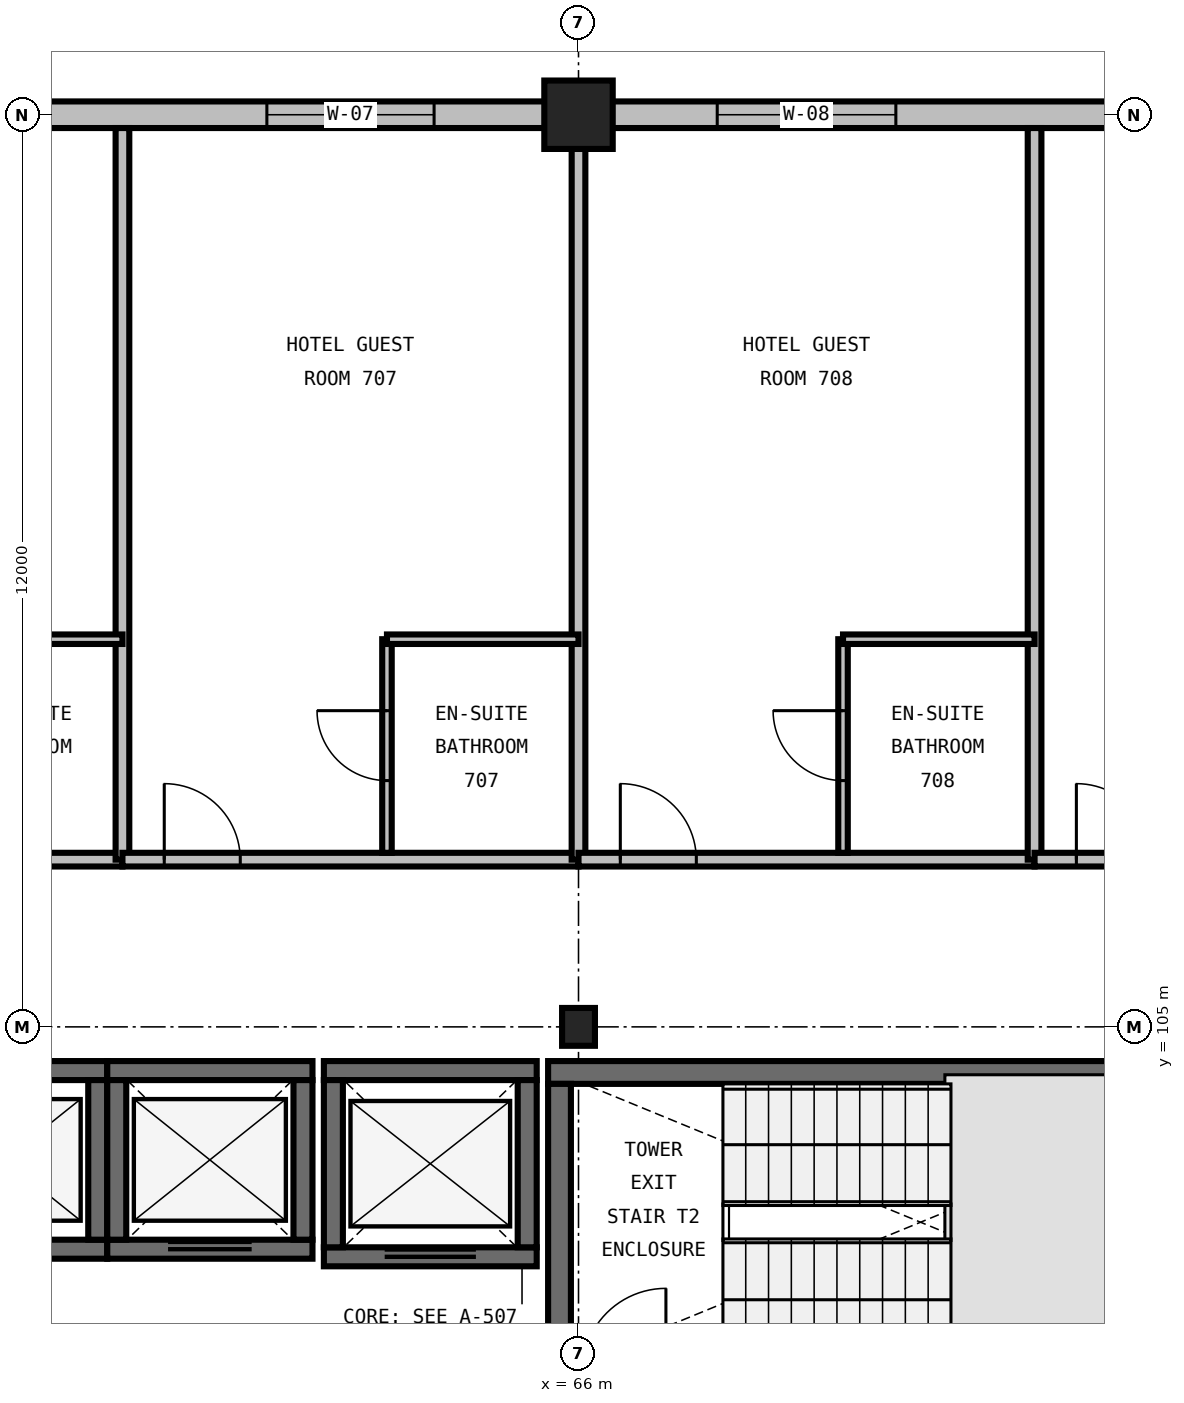
"""IFC4 building model, lengths in metres.
Left out: names, types, materials, properties, quantities, classifications, styles, units other than length and angle.
Written with IfcOpenShell. Run it as: python <this file> out.ifc"""

import sys

from ifc_helpers import new_model, si_unit, direction, frame, frame_2d, origin, origin_2d, place, context, subcontext, project, spatial, rectangle, i_section, extrude, element, fill, save


model = new_model("IFC4")
c1 = context("Model", 3, precision=1e-05, world=origin(), true_north=direction((0.0, 1.0)))
c2 = subcontext(c1, "Body", "Model", "MODEL_VIEW")
j1 = project(units=[si_unit("LENGTHUNIT", "METRE"), si_unit("PLANEANGLEUNIT", "RADIAN")], contexts=[c1])
p1 = place(None, origin())
s1 = spatial("IfcSite", under=j1, at=p1, CompositionType="ELEMENT")
p2 = place(p1, origin())
s2 = spatial("IfcBuilding", under=s1, at=p2, CompositionType="ELEMENT")
p3 = place(p2, frame((0.0, 0.0, 34.8)))
s3 = spatial("IfcBuildingStorey", under=s2, at=p3, CompositionType="ELEMENT", Elevation=34.8)
p4 = place(p3, frame((66.0, 105.0, 0.0), z_axis=(0.0, 0.0, 1.0), x_axis=(1.0, 0.0, 0.0)))
e1 = element("IfcColumn", 1, at=p4, inside=s3, PredefinedType="COLUMN", context=c2, shape_type="SweptSolid", body=[
    extrude(i_section(OverallWidth=0.432, OverallDepth=0.498, WebThickness=0.056, FlangeThickness=0.089, FilletRadius=0.031, at=origin_2d()), origin(), (0.0, 0.0, 1.0), 3.6),
])
p5 = place(p3, frame((66.0, 117.0, 0.0), z_axis=(0.0, 0.0, 1.0), x_axis=(1.0, 0.0, 0.0)))
e2 = element("IfcColumn", 2, at=p5, inside=s3, PredefinedType="COLUMN", context=c2, shape_type="SweptSolid", body=[
    extrude(rectangle(XDim=0.9, YDim=0.9, at=origin_2d()), origin(), (0.0, 0.0, 1.0), 3.6),
])
p6 = place(p3, frame((75.4, 104.4, 0.0), z_axis=(0.0, 0.0, 1.0), x_axis=(-1.0, 0.0, 0.0)))
e3 = element("IfcWall", 3, at=p6, inside=s3, PredefinedType="SHEAR", context=c2, shape_type="SweptSolid", body=[
    extrude(rectangle(XDim=9.8, YDim=0.3, at=frame_2d((4.9, 0.0))), origin(), (0.0, 0.0, 1.0), 3.6),
])
p7 = place(p3, frame((65.75, 104.25, 0.0), z_axis=(0.0, 0.0, 1.0), x_axis=(0.0, -1.0, 0.0)))
e4 = element("IfcWall", 4, at=p7, inside=s3, PredefinedType="SHEAR", context=c2, shape_type="SweptSolid", body=[
    extrude(rectangle(XDim=3.64, YDim=0.3, at=frame_2d((1.82, 0.0))), origin(), (0.0, 0.0, 1.0), 3.6),
])
p8 = place(p3, frame((62.65, 101.975, 0.0), z_axis=(0.0, 0.0, 1.0), x_axis=(1.0, 0.0, 0.0)))
e5 = element("IfcWall", 5, at=p8, inside=s3, PredefinedType="SHEAR", context=c2, shape_type="SweptSolid", body=[
    extrude(rectangle(XDim=2.8, YDim=0.25, at=frame_2d((1.4, 0.0))), origin(), (0.0, 0.0, 1.0), 3.6),
])
p9 = place(p8, frame((0.8, 0.0, 0.0)))
e6 = element("IfcOpeningElement", 6, at=p9, cuts=e5, PredefinedType="OPENING", context=c2, shape_type="SweptSolid", body=[
    extrude(rectangle(XDim=1.2, YDim=2.2, at=frame_2d((0.6, 1.1))), frame((0.0, 0.14, 0.0), z_axis=(0.0, -1.0, 0.0), x_axis=(1.0, 0.0, 0.0)), (0.0, 0.0, 1.0), 0.28),
])
p10 = place(p3, frame((65.45, 104.425, 0.0), z_axis=(0.0, 0.0, 1.0), x_axis=(-1.0, 0.0, 0.0)))
e7 = element("IfcWall", 7, at=p10, inside=s3, PredefinedType="SHEAR", context=c2, shape_type="SweptSolid", body=[
    extrude(rectangle(XDim=2.8, YDim=0.25, at=frame_2d((1.4, 0.0))), origin(), (0.0, 0.0, 1.0), 3.6),
])
for number, where, z_axis, x_axis in (
    (8, (62.775, 104.3, 0.0), (0.0, 0.0, 1.0), (0.0, -1.0, 0.0)),
    (9, (65.325, 102.1, 0.0), (0.0, 0.0, 1.0), (0.0, 1.0, 0.0)),
):
    element("IfcWall", number, at=place(p3, frame(where, z_axis=z_axis, x_axis=x_axis)), inside=s3, PredefinedType="SHEAR", context=c2, shape_type="SweptSolid", body=[
        extrude(rectangle(XDim=2.2, YDim=0.25, at=frame_2d((1.1, 0.0))), origin(), (0.0, 0.0, 1.0), 3.6),
    ])
p11 = place(p3, frame((57.1, 102.075, 0.0), z_axis=(0.0, 0.0, 1.0), x_axis=(1.0, 0.0, 0.0)))
e10 = element("IfcWall", 10, at=p11, inside=s3, PredefinedType="SHEAR", context=c2, shape_type="SweptSolid", body=[
    extrude(rectangle(XDim=2.7, YDim=0.25, at=frame_2d((1.35, 0.0))), origin(), (0.0, 0.0, 1.0), 3.6),
])
p12 = place(p11, frame((0.8, 0.0, 0.0)))
e11 = element("IfcOpeningElement", 11, at=p12, cuts=e10, PredefinedType="OPENING", context=c2, shape_type="SweptSolid", body=[
    extrude(rectangle(XDim=1.1, YDim=2.2, at=frame_2d((0.55, 1.1))), frame((0.0, 0.14, 0.0), z_axis=(0.0, -1.0, 0.0), x_axis=(1.0, 0.0, 0.0)), (0.0, 0.0, 1.0), 0.28),
])
p13 = place(p3, frame((59.8, 104.425, 0.0), z_axis=(0.0, 0.0, 1.0), x_axis=(-1.0, 0.0, 0.0)))
e12 = element("IfcWall", 12, at=p13, inside=s3, PredefinedType="SHEAR", context=c2, shape_type="SweptSolid", body=[
    extrude(rectangle(XDim=2.7, YDim=0.25, at=frame_2d((1.35, 0.0))), origin(), (0.0, 0.0, 1.0), 3.6),
])
p14 = place(p3, frame((59.675, 102.2, 0.0), z_axis=(0.0, 0.0, 1.0), x_axis=(0.0, 1.0, 0.0)))
e13 = element("IfcWall", 13, at=p14, inside=s3, PredefinedType="SHEAR", context=c2, shape_type="SweptSolid", body=[
    extrude(rectangle(XDim=2.1, YDim=0.25, at=frame_2d((1.05, 0.0))), origin(), (0.0, 0.0, 1.0), 3.6),
])
p15 = place(p3, frame((59.8, 102.075, 0.0), z_axis=(0.0, 0.0, 1.0), x_axis=(1.0, 0.0, 0.0)))
e14 = element("IfcWall", 14, at=p15, inside=s3, PredefinedType="SHEAR", context=c2, shape_type="SweptSolid", body=[
    extrude(rectangle(XDim=2.7, YDim=0.25, at=frame_2d((1.35, 0.0))), origin(), (0.0, 0.0, 1.0), 3.6),
])
p16 = place(p15, frame((0.8, 0.0, 0.0)))
e15 = element("IfcOpeningElement", 15, at=p16, cuts=e14, PredefinedType="OPENING", context=c2, shape_type="SweptSolid", body=[
    extrude(rectangle(XDim=1.1, YDim=2.2, at=frame_2d((0.55, 1.1))), frame((0.0, 0.14, 0.0), z_axis=(0.0, -1.0, 0.0), x_axis=(1.0, 0.0, 0.0)), (0.0, 0.0, 1.0), 0.28),
])
p17 = place(p3, frame((62.5, 104.425, 0.0), z_axis=(0.0, 0.0, 1.0), x_axis=(-1.0, 0.0, 0.0)))
e16 = element("IfcWall", 16, at=p17, inside=s3, PredefinedType="SHEAR", context=c2, shape_type="SweptSolid", body=[
    extrude(rectangle(XDim=2.7, YDim=0.25, at=frame_2d((1.35, 0.0))), origin(), (0.0, 0.0, 1.0), 3.6),
])
for number, where, z_axis, x_axis in (
    (17, (59.925, 104.3, 0.0), (0.0, 0.0, 1.0), (0.0, -1.0, 0.0)),
    (18, (62.375, 102.2, 0.0), (0.0, 0.0, 1.0), (0.0, 1.0, 0.0)),
):
    element("IfcWall", number, at=place(p3, frame(where, z_axis=z_axis, x_axis=x_axis)), inside=s3, PredefinedType="SHEAR", context=c2, shape_type="SweptSolid", body=[
        extrude(rectangle(XDim=2.1, YDim=0.25, at=frame_2d((1.05, 0.0))), origin(), (0.0, 0.0, 1.0), 3.6),
    ])
p18 = place(p3, frame((66.0, 117.0, 0.0), z_axis=(0.0, 0.0, 1.0), x_axis=(-1.0, 0.0, 0.0)))
e19 = element("IfcWall", 19, at=p18, inside=s3, PredefinedType="STANDARD", context=c2, shape_type="SweptSolid", body=[
    extrude(rectangle(XDim=12.0, YDim=0.35, at=frame_2d((6.0, 0.0))), origin(), (0.0, 0.0, 1.0), 2.486),
])
p19 = place(p18, frame((1.9, 0.0, 0.75)))
e20 = element("IfcOpeningElement", 20, at=p19, cuts=e19, PredefinedType="OPENING", context=c2, shape_type="SweptSolid", body=[
    extrude(rectangle(XDim=2.2, YDim=1.6, at=frame_2d((1.1, 0.8))), frame((0.0, 0.19, 0.0), z_axis=(0.0, -1.0, 0.0), x_axis=(1.0, 0.0, 0.0)), (0.0, 0.0, 1.0), 0.38),
])
p20 = place(p18, frame((7.825, 0.0, 0.75)))
e21 = element("IfcOpeningElement", 21, at=p20, cuts=e19, PredefinedType="OPENING", context=c2, shape_type="SweptSolid", body=[
    extrude(rectangle(XDim=2.35, YDim=1.6, at=frame_2d((1.175, 0.8))), frame((0.0, 0.19, 0.0), z_axis=(0.0, -1.0, 0.0), x_axis=(1.0, 0.0, 0.0)), (0.0, 0.0, 1.0), 0.38),
])
p21 = place(p3, frame((78.0, 117.0, 0.0), z_axis=(0.0, 0.0, 1.0), x_axis=(-1.0, 0.0, 0.0)))
e22 = element("IfcWall", 22, at=p21, inside=s3, PredefinedType="STANDARD", context=c2, shape_type="SweptSolid", body=[
    extrude(rectangle(XDim=12.0, YDim=0.35, at=frame_2d((6.0, 0.0))), origin(), (0.0, 0.0, 1.0), 2.486),
])
p22 = place(p21, frame((1.9, 0.0, 0.75)))
e23 = element("IfcOpeningElement", 23, at=p22, cuts=e22, PredefinedType="OPENING", context=c2, shape_type="SweptSolid", body=[
    extrude(rectangle(XDim=2.2, YDim=1.6, at=frame_2d((1.1, 0.8))), frame((0.0, 0.19, 0.0), z_axis=(0.0, -1.0, 0.0), x_axis=(1.0, 0.0, 0.0)), (0.0, 0.0, 1.0), 0.38),
])
p23 = place(p21, frame((7.825, 0.0, 0.75)))
e24 = element("IfcOpeningElement", 24, at=p23, cuts=e22, PredefinedType="OPENING", context=c2, shape_type="SweptSolid", body=[
    extrude(rectangle(XDim=2.35, YDim=1.6, at=frame_2d((1.175, 0.8))), frame((0.0, 0.19, 0.0), z_axis=(0.0, -1.0, 0.0), x_axis=(1.0, 0.0, 0.0)), (0.0, 0.0, 1.0), 0.38),
])
p24 = place(p3, frame((54.0, 107.2, 0.0), z_axis=(0.0, 0.0, 1.0), x_axis=(1.0, 0.0, 0.0)))
e25 = element("IfcWall", 25, at=p24, inside=s3, PredefinedType="PARTITIONING", context=c2, shape_type="SweptSolid", body=[
    extrude(rectangle(XDim=6.0, YDim=0.18, at=frame_2d((3.0, 0.0))), origin(), (0.0, 0.0, 1.0), 3.29),
])
p25 = place(p24, frame((0.55, 0.0, 0.0)))
e26 = element("IfcOpeningElement", 26, at=p25, cuts=e25, PredefinedType="OPENING", context=c2, shape_type="SweptSolid", body=[
    extrude(rectangle(XDim=1.0, YDim=2.15, at=frame_2d((0.5, 1.075))), frame((0.0, 0.105, 0.0), z_axis=(0.0, -1.0, 0.0), x_axis=(1.0, 0.0, 0.0)), (0.0, 0.0, 1.0), 0.21),
])
p26 = place(p3, frame((60.0, 107.2, 0.0), z_axis=(0.0, 0.0, 1.0), x_axis=(0.0, 1.0, 0.0)))
e27 = element("IfcWall", 27, at=p26, inside=s3, PredefinedType="PARTITIONING", context=c2, shape_type="SweptSolid", body=[
    extrude(rectangle(XDim=9.625, YDim=0.18, at=frame_2d((4.812, 0.0))), origin(), (0.0, 0.0, 1.0), 3.29),
])
p27 = place(p3, frame((57.48, 110.1, 0.0), z_axis=(0.0, 0.0, 1.0), x_axis=(1.0, 0.0, 0.0)))
e28 = element("IfcWall", 28, at=p27, inside=s3, PredefinedType="PARTITIONING", context=c2, shape_type="SweptSolid", body=[
    extrude(rectangle(XDim=2.52, YDim=0.125, at=frame_2d((1.26, 0.0))), origin(), (0.0, 0.0, 1.0), 3.29),
])
p28 = place(p3, frame((60.0, 107.2, 0.0), z_axis=(0.0, 0.0, 1.0), x_axis=(1.0, 0.0, 0.0)))
e29 = element("IfcWall", 29, at=p28, inside=s3, PredefinedType="PARTITIONING", context=c2, shape_type="SweptSolid", body=[
    extrude(rectangle(XDim=6.0, YDim=0.18, at=frame_2d((3.0, 0.0))), origin(), (0.0, 0.0, 1.0), 3.29),
])
p29 = place(p28, frame((0.55, 0.0, 0.0)))
e30 = element("IfcOpeningElement", 30, at=p29, cuts=e29, PredefinedType="OPENING", context=c2, shape_type="SweptSolid", body=[
    extrude(rectangle(XDim=1.0, YDim=2.15, at=frame_2d((0.5, 1.075))), frame((0.0, 0.105, 0.0), z_axis=(0.0, -1.0, 0.0), x_axis=(1.0, 0.0, 0.0)), (0.0, 0.0, 1.0), 0.21),
])
p30 = place(p3, frame((66.0, 107.2, 0.0), z_axis=(0.0, 0.0, 1.0), x_axis=(0.0, 1.0, 0.0)))
e31 = element("IfcWall", 31, at=p30, inside=s3, PredefinedType="PARTITIONING", context=c2, shape_type="SweptSolid", body=[
    extrude(rectangle(XDim=9.625, YDim=0.18, at=frame_2d((4.812, 0.0))), origin(), (0.0, 0.0, 1.0), 2.59),
])
p31 = place(p3, frame((63.48, 107.29, 0.0), z_axis=(0.0, 0.0, 1.0), x_axis=(0.0, 1.0, 0.0)))
e32 = element("IfcWall", 32, at=p31, inside=s3, PredefinedType="PARTITIONING", context=c2, shape_type="SweptSolid", body=[
    extrude(rectangle(XDim=2.81, YDim=0.125, at=frame_2d((1.405, 0.0))), origin(), (0.0, 0.0, 1.0), 3.29),
])
p32 = place(p31, frame((0.95, 0.0, 0.0)))
e33 = element("IfcOpeningElement", 33, at=p32, cuts=e32, PredefinedType="OPENING", context=c2, shape_type="SweptSolid", body=[
    extrude(rectangle(XDim=0.92, YDim=2.1, at=frame_2d((0.46, 1.05))), frame((0.0, 0.077, 0.0), z_axis=(0.0, -1.0, 0.0), x_axis=(1.0, 0.0, 0.0)), (0.0, 0.0, 1.0), 0.155),
])
p33 = place(p3, frame((63.48, 110.1, 0.0), z_axis=(0.0, 0.0, 1.0), x_axis=(1.0, 0.0, 0.0)))
e34 = element("IfcWall", 34, at=p33, inside=s3, PredefinedType="PARTITIONING", context=c2, shape_type="SweptSolid", body=[
    extrude(rectangle(XDim=2.52, YDim=0.125, at=frame_2d((1.26, 0.0))), origin(), (0.0, 0.0, 1.0), 3.29),
])
p34 = place(p3, frame((66.0, 107.2, 0.0), z_axis=(0.0, 0.0, 1.0), x_axis=(1.0, 0.0, 0.0)))
e35 = element("IfcWall", 35, at=p34, inside=s3, PredefinedType="PARTITIONING", context=c2, shape_type="SweptSolid", body=[
    extrude(rectangle(XDim=6.0, YDim=0.18, at=frame_2d((3.0, 0.0))), origin(), (0.0, 0.0, 1.0), 3.29),
])
p35 = place(p34, frame((0.55, 0.0, 0.0)))
e36 = element("IfcOpeningElement", 36, at=p35, cuts=e35, PredefinedType="OPENING", context=c2, shape_type="SweptSolid", body=[
    extrude(rectangle(XDim=1.0, YDim=2.15, at=frame_2d((0.5, 1.075))), frame((0.0, 0.105, 0.0), z_axis=(0.0, -1.0, 0.0), x_axis=(1.0, 0.0, 0.0)), (0.0, 0.0, 1.0), 0.21),
])
p36 = place(p3, frame((72.0, 107.2, 0.0), z_axis=(0.0, 0.0, 1.0), x_axis=(0.0, 1.0, 0.0)))
e37 = element("IfcWall", 37, at=p36, inside=s3, PredefinedType="PARTITIONING", context=c2, shape_type="SweptSolid", body=[
    extrude(rectangle(XDim=9.625, YDim=0.18, at=frame_2d((4.812, 0.0))), origin(), (0.0, 0.0, 1.0), 3.29),
])
p37 = place(p3, frame((69.48, 107.29, 0.0), z_axis=(0.0, 0.0, 1.0), x_axis=(0.0, 1.0, 0.0)))
e38 = element("IfcWall", 38, at=p37, inside=s3, PredefinedType="PARTITIONING", context=c2, shape_type="SweptSolid", body=[
    extrude(rectangle(XDim=2.81, YDim=0.125, at=frame_2d((1.405, 0.0))), origin(), (0.0, 0.0, 1.0), 3.29),
])
p38 = place(p37, frame((0.95, 0.0, 0.0)))
e39 = element("IfcOpeningElement", 39, at=p38, cuts=e38, PredefinedType="OPENING", context=c2, shape_type="SweptSolid", body=[
    extrude(rectangle(XDim=0.92, YDim=2.1, at=frame_2d((0.46, 1.05))), frame((0.0, 0.077, 0.0), z_axis=(0.0, -1.0, 0.0), x_axis=(1.0, 0.0, 0.0)), (0.0, 0.0, 1.0), 0.155),
])
p39 = place(p3, frame((69.48, 110.1, 0.0), z_axis=(0.0, 0.0, 1.0), x_axis=(1.0, 0.0, 0.0)))
e40 = element("IfcWall", 40, at=p39, inside=s3, PredefinedType="PARTITIONING", context=c2, shape_type="SweptSolid", body=[
    extrude(rectangle(XDim=2.52, YDim=0.125, at=frame_2d((1.26, 0.0))), origin(), (0.0, 0.0, 1.0), 3.29),
])
p40 = place(p3, frame((72.0, 107.2, 0.0), z_axis=(0.0, 0.0, 1.0), x_axis=(1.0, 0.0, 0.0)))
e41 = element("IfcWall", 41, at=p40, inside=s3, PredefinedType="PARTITIONING", context=c2, shape_type="SweptSolid", body=[
    extrude(rectangle(XDim=6.0, YDim=0.18, at=frame_2d((3.0, 0.0))), origin(), (0.0, 0.0, 1.0), 3.29),
])
p41 = place(p40, frame((0.55, 0.0, 0.0)))
e42 = element("IfcOpeningElement", 42, at=p41, cuts=e41, PredefinedType="OPENING", context=c2, shape_type="SweptSolid", body=[
    extrude(rectangle(XDim=1.0, YDim=2.15, at=frame_2d((0.5, 1.075))), frame((0.0, 0.105, 0.0), z_axis=(0.0, -1.0, 0.0), x_axis=(1.0, 0.0, 0.0)), (0.0, 0.0, 1.0), 0.21),
])
p42 = place(p9, origin())
e43 = element("IfcDoor", 43, at=p42, inside=s3, OperationType="DOUBLE_DOOR_SLIDING", PredefinedType="DOOR", context=c2, shape_type="SweptSolid", body=[
    extrude(rectangle(XDim=1.2, YDim=2.2, at=frame_2d((0.6, 1.1))), frame((0.0, 0.025, 0.0), z_axis=(0.0, -1.0, 0.0), x_axis=(1.0, 0.0, 0.0)), (0.0, 0.0, 1.0), 0.05),
])
fill(e6, e43)
p43 = place(p16, origin())
e44 = element("IfcDoor", 44, at=p43, inside=s3, OperationType="DOUBLE_DOOR_SLIDING", PredefinedType="DOOR", context=c2, shape_type="SweptSolid", body=[
    extrude(rectangle(XDim=1.1, YDim=2.2, at=frame_2d((0.55, 1.1))), frame((0.0, 0.025, 0.0), z_axis=(0.0, -1.0, 0.0), x_axis=(1.0, 0.0, 0.0)), (0.0, 0.0, 1.0), 0.05),
])
fill(e15, e44)
p44 = place(p19, origin())
e45 = element("IfcWindow", 45, at=p44, inside=s3, PartitioningType="DOUBLE_PANEL_VERTICAL", PredefinedType="WINDOW", context=c2, shape_type="SweptSolid", body=[
    extrude(rectangle(XDim=2.2, YDim=1.6, at=frame_2d((1.1, 0.8))), frame((0.0, 0.03, 0.0), z_axis=(0.0, -1.0, 0.0), x_axis=(1.0, 0.0, 0.0)), (0.0, 0.0, 1.0), 0.06),
])
fill(e20, e45)
p45 = place(p23, origin())
e46 = element("IfcWindow", 46, at=p45, inside=s3, PartitioningType="DOUBLE_PANEL_VERTICAL", PredefinedType="WINDOW", context=c2, shape_type="SweptSolid", body=[
    extrude(rectangle(XDim=2.35, YDim=1.6, at=frame_2d((1.175, 0.8))), frame((0.0, 0.03, 0.0), z_axis=(0.0, -1.0, 0.0), x_axis=(1.0, 0.0, 0.0)), (0.0, 0.0, 1.0), 0.06),
])
fill(e24, e46)
p46 = place(p29, origin())
e47 = element("IfcDoor", 47, at=p46, inside=s3, OperationType="SINGLE_SWING_LEFT", PredefinedType="DOOR", context=c2, shape_type="SweptSolid", body=[
    extrude(rectangle(XDim=1.0, YDim=2.15, at=frame_2d((0.5, 1.075))), frame((0.0, 0.025, 0.0), z_axis=(0.0, -1.0, 0.0), x_axis=(1.0, 0.0, 0.0)), (0.0, 0.0, 1.0), 0.05),
])
fill(e30, e47)
p47 = place(p32, origin())
e48 = element("IfcDoor", 48, at=p47, inside=s3, OperationType="SINGLE_SWING_RIGHT", PredefinedType="DOOR", context=c2, shape_type="SweptSolid", body=[
    extrude(rectangle(XDim=0.92, YDim=2.1, at=frame_2d((0.46, 1.05))), frame((0.0, 0.025, 0.0), z_axis=(0.0, -1.0, 0.0), x_axis=(1.0, 0.0, 0.0)), (0.0, 0.0, 1.0), 0.05),
])
fill(e33, e48)
p48 = place(p35, origin())
e49 = element("IfcDoor", 49, at=p48, inside=s3, OperationType="SINGLE_SWING_LEFT", PredefinedType="DOOR", context=c2, shape_type="SweptSolid", body=[
    extrude(rectangle(XDim=1.0, YDim=2.15, at=frame_2d((0.5, 1.075))), frame((0.0, 0.025, 0.0), z_axis=(0.0, -1.0, 0.0), x_axis=(1.0, 0.0, 0.0)), (0.0, 0.0, 1.0), 0.05),
])
fill(e36, e49)
p49 = place(p38, origin())
e50 = element("IfcDoor", 50, at=p49, inside=s3, OperationType="SINGLE_SWING_RIGHT", PredefinedType="DOOR", context=c2, shape_type="SweptSolid", body=[
    extrude(rectangle(XDim=0.92, YDim=2.1, at=frame_2d((0.46, 1.05))), frame((0.0, 0.025, 0.0), z_axis=(0.0, -1.0, 0.0), x_axis=(1.0, 0.0, 0.0)), (0.0, 0.0, 1.0), 0.05),
])
fill(e39, e50)
p50 = place(p41, origin())
e51 = element("IfcDoor", 51, at=p50, inside=s3, OperationType="SINGLE_SWING_LEFT", PredefinedType="DOOR", context=c2, shape_type="SweptSolid", body=[
    extrude(rectangle(XDim=1.0, YDim=2.15, at=frame_2d((0.5, 1.075))), frame((0.0, 0.025, 0.0), z_axis=(0.0, -1.0, 0.0), x_axis=(1.0, 0.0, 0.0)), (0.0, 0.0, 1.0), 0.05),
])
fill(e42, e51)
save(model, sys.argv[1])
